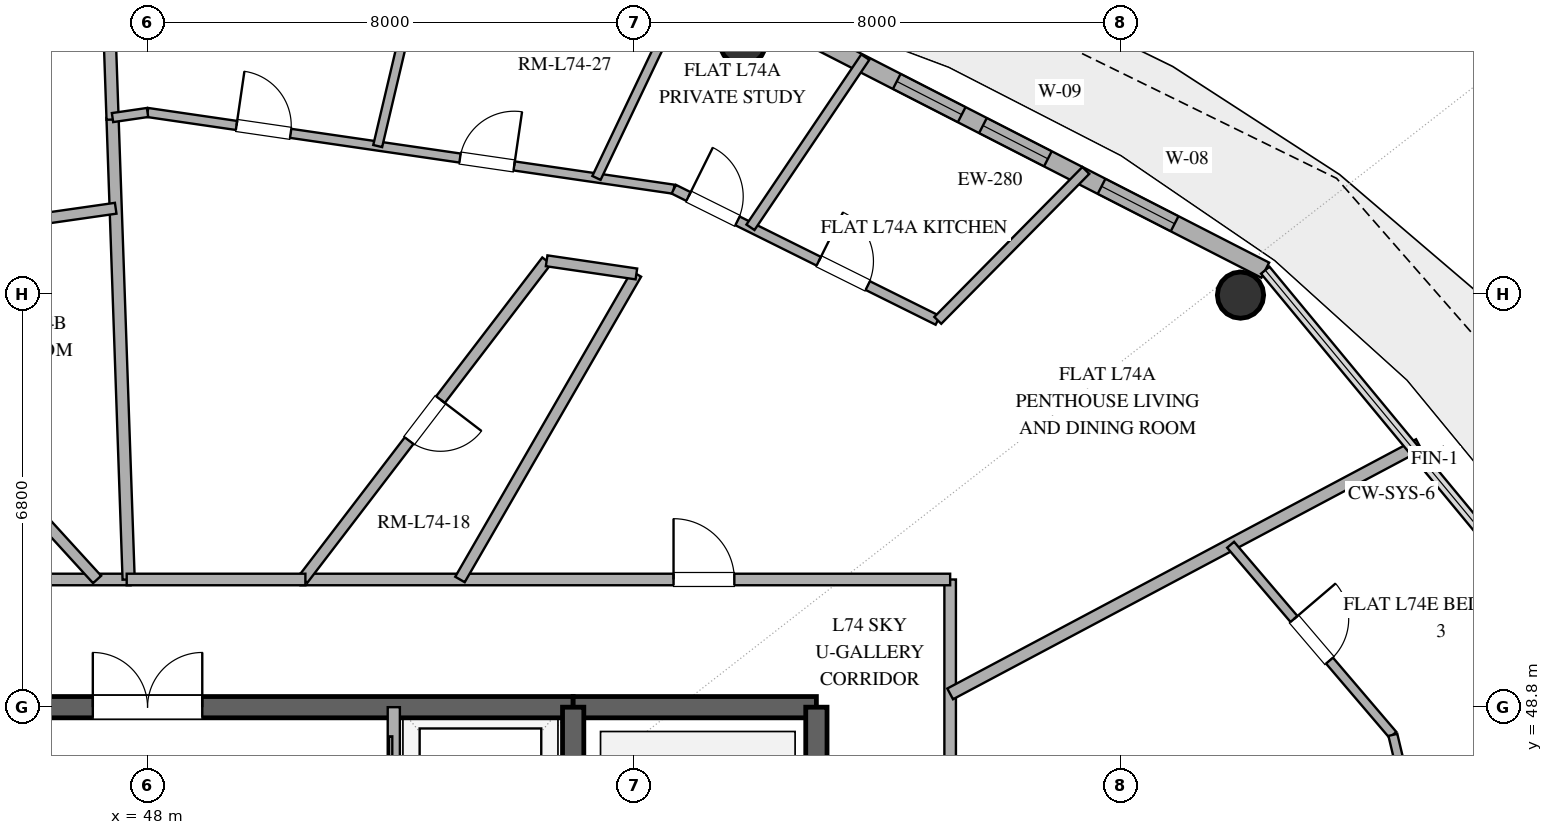
"""IFC4 building model, lengths in metres.
Left out: names, types, materials, properties, quantities, classifications, styles, units other than length and angle.
Written with IfcOpenShell. Run it as: python <this file> out.ifc"""

import sys

from ifc_helpers import new_model, si_unit, direction, frame, frame_2d, origin, origin_2d, place, context, subcontext, project, spatial, rectangle, hollow_circle, extrude, element, fill, save


model = new_model("IFC4")
c1 = context("Model", 3, precision=1e-05, world=origin(), true_north=direction((0.0, 1.0)))
c2 = subcontext(c1, "Body", "Model", "MODEL_VIEW")
j1 = project(units=[si_unit("LENGTHUNIT", "METRE"), si_unit("PLANEANGLEUNIT", "RADIAN")], contexts=[c1])
p1 = place(None, origin())
s1 = spatial("IfcSite", under=j1, at=p1, CompositionType="ELEMENT")
p2 = place(p1, origin())
s2 = spatial("IfcBuilding", under=s1, at=p2, CompositionType="ELEMENT")
p3 = place(p2, frame((0.0, 0.0, 287.4)))
s3 = spatial("IfcBuildingStorey", under=s2, at=p3, CompositionType="ELEMENT", Elevation=287.4)
p4 = place(p3, frame((41.0, 48.8, 0.0), z_axis=(0.0, 0.0, 1.0), x_axis=(1.0, 0.0, 0.0)))
e1 = element("IfcWall", 1, at=p4, inside=s3, PredefinedType="SHEAR", context=c2, shape_type="SweptSolid", body=[
    extrude(rectangle(XDim=14.0, YDim=0.35, at=frame_2d((7.0, 0.0))), origin(), (0.0, 0.0, 1.0), 3.37),
])
p5 = place(p4, frame((6.1, 0.0, 0.0)))
e2 = element("IfcOpeningElement", 2, at=p5, cuts=e1, PredefinedType="OPENING", context=c2, shape_type="SweptSolid", body=[
    extrude(rectangle(XDim=1.8, YDim=2.25, at=frame_2d((0.9, 1.125))), frame((0.0, 0.185, 0.0), z_axis=(0.0, -1.0, 0.0), x_axis=(1.0, 0.0, 0.0)), (0.0, 0.0, 1.0), 0.37),
])
p6 = place(p3, frame((55.0, 48.8, 0.0), z_axis=(0.0, 0.0, 1.0), x_axis=(1.0, 0.0, 0.0)))
e3 = element("IfcWall", 3, at=p6, inside=s3, PredefinedType="SHEAR", context=c2, shape_type="SweptSolid", body=[
    extrude(rectangle(XDim=4.0, YDim=0.35, at=frame_2d((2.0, 0.0))), origin(), (0.0, 0.0, 1.0), 3.37),
])
p7 = place(p3, frame((59.0, 35.2, 0.0), z_axis=(0.0, 0.0, 1.0), x_axis=(0.0, 1.0, 0.0)))
e4 = element("IfcWall", 4, at=p7, inside=s3, PredefinedType="SHEAR", context=c2, shape_type="SweptSolid", body=[
    extrude(rectangle(XDim=13.6, YDim=0.35, at=frame_2d((6.8, 0.0))), origin(), (0.0, 0.0, 1.0), 3.37),
])
p8 = place(p7, frame((1.5, 0.0, 0.0)))
e5 = element("IfcOpeningElement", 5, at=p8, cuts=e4, PredefinedType="OPENING", context=c2, shape_type="SweptSolid", body=[
    extrude(rectangle(XDim=1.2, YDim=2.15, at=frame_2d((0.6, 1.075))), frame((0.0, 0.185, 0.0), z_axis=(0.0, -1.0, 0.0), x_axis=(1.0, 0.0, 0.0)), (0.0, 0.0, 1.0), 0.37),
])
p9 = place(p3, frame((55.0, 35.2, 0.0), z_axis=(0.0, 0.0, 1.0), x_axis=(0.0, 1.0, 0.0)))
e6 = element("IfcWall", 6, at=p9, inside=s3, PredefinedType="SHEAR", context=c2, shape_type="SweptSolid", body=[
    extrude(rectangle(XDim=13.6, YDim=0.35, at=frame_2d((6.8, 0.0))), origin(), (0.0, 0.0, 1.0), 3.37),
])
p10 = place(p9, frame((1.15, 0.0, 0.0)))
e7 = element("IfcOpeningElement", 7, at=p10, cuts=e6, PredefinedType="OPENING", context=c2, shape_type="SweptSolid", body=[
    extrude(rectangle(XDim=1.1, YDim=2.2, at=frame_2d((0.55, 1.1))), frame((0.0, 0.185, 0.0), z_axis=(0.0, -1.0, 0.0), x_axis=(1.0, 0.0, 0.0)), (0.0, 0.0, 1.0), 0.37),
])
for number, where, z_axis, x_axis in (
    (8, (65.975, 55.576, 0.0), (0.0, 0.0, 1.0), (1.0, 0.0, 0.0)),
    (9, (57.791, 59.739, 0.0), (0.0, 0.0, 1.0), (1.0, 0.0, 0.0)),
):
    element("IfcColumn", number, at=place(p3, frame(where, z_axis=z_axis, x_axis=x_axis)), inside=s3, PredefinedType="COLUMN", context=c2, shape_type="SweptSolid", body=[
        extrude(hollow_circle(Radius=0.381, WallThickness=0.025, at=origin_2d()), origin(), (0.0, 0.0, 1.0), 3.37),
    ])
p11 = place(p3, frame((66.383, 55.987, 0.0), z_axis=(0.0, 0.0, 1.0), x_axis=(-0.890007394051, 0.455946091699, 0.0)))
e10 = element("IfcWall", 10, at=p11, inside=s3, PredefinedType="SOLIDWALL", context=c2, shape_type="SweptSolid", body=[
    extrude(rectangle(XDim=9.404, YDim=0.28, at=frame_2d((4.702, 0.0))), origin(), (0.0, 0.0, 1.0), 3.37),
])
p12 = place(p11, frame((1.675, 0.0, 0.85)))
e11 = element("IfcOpeningElement", 11, at=p12, cuts=e10, PredefinedType="OPENING", context=c2, shape_type="SweptSolid", body=[
    extrude(rectangle(XDim=1.35, YDim=1.8, at=frame_2d((0.675, 0.9))), frame((0.0, 0.15, 0.0), z_axis=(0.0, -1.0, 0.0), x_axis=(1.0, 0.0, 0.0)), (0.0, 0.0, 1.0), 0.3),
])
p13 = place(p11, frame((4.017, 0.0, 0.85)))
e12 = element("IfcOpeningElement", 12, at=p13, cuts=e10, PredefinedType="OPENING", context=c2, shape_type="SweptSolid", body=[
    extrude(rectangle(XDim=1.2, YDim=1.8, at=frame_2d((0.6, 0.9))), frame((0.0, 0.15, 0.0), z_axis=(0.0, -1.0, 0.0), x_axis=(1.0, 0.0, 0.0)), (0.0, 0.0, 1.0), 0.3),
])
p14 = place(p11, frame((5.609, 0.0, 0.85)))
e13 = element("IfcOpeningElement", 13, at=p14, cuts=e10, PredefinedType="OPENING", context=c2, shape_type="SweptSolid", body=[
    extrude(rectangle(XDim=1.2, YDim=1.8, at=frame_2d((0.6, 0.9))), frame((0.0, 0.15, 0.0), z_axis=(0.0, -1.0, 0.0), x_axis=(1.0, 0.0, 0.0)), (0.0, 0.0, 1.0), 0.3),
])
p15 = place(p3, frame((52.05, 40.98, 0.0), z_axis=(0.0, 0.0, 1.0), x_axis=(0.0, 1.0, 0.0)))
e14 = element("IfcWall", 14, at=p15, inside=s3, PredefinedType="SOLIDWALL", context=c2, shape_type="SweptSolid", body=[
    extrude(rectangle(XDim=7.82, YDim=0.2, at=frame_2d((3.91, 0.0))), origin(), (0.0, 0.0, 1.0), 2.73),
])
p16 = place(p15, frame((0.65, 0.0, 0.0)))
e15 = element("IfcOpeningElement", 15, at=p16, cuts=e14, PredefinedType="OPENING", context=c2, shape_type="SweptSolid", body=[
    extrude(rectangle(XDim=1.1, YDim=2.2, at=frame_2d((0.55, 1.1))), frame((0.0, 0.11, 0.0), z_axis=(0.0, -1.0, 0.0), x_axis=(1.0, 0.0, 0.0)), (0.0, 0.0, 1.0), 0.22),
])
p17 = place(p15, frame((3.05, 0.0, 0.0)))
e16 = element("IfcOpeningElement", 16, at=p17, cuts=e14, PredefinedType="OPENING", context=c2, shape_type="SweptSolid", body=[
    extrude(rectangle(XDim=1.1, YDim=2.2, at=frame_2d((0.55, 1.1))), frame((0.0, 0.11, 0.0), z_axis=(0.0, -1.0, 0.0), x_axis=(1.0, 0.0, 0.0)), (0.0, 0.0, 1.0), 0.22),
])
p18 = place(p15, frame((5.6, 0.0, 0.0)))
e17 = element("IfcOpeningElement", 17, at=p18, cuts=e14, PredefinedType="OPENING", context=c2, shape_type="SweptSolid", body=[
    extrude(rectangle(XDim=1.2, YDim=2.2, at=frame_2d((0.6, 1.1))), frame((0.0, 0.11, 0.0), z_axis=(0.0, -1.0, 0.0), x_axis=(1.0, 0.0, 0.0)), (0.0, 0.0, 1.0), 0.22),
])
p19 = place(p3, frame((61.2, 50.9, 0.0), z_axis=(0.0, 0.0, 1.0), x_axis=(0.0, -1.0, 0.0)))
e18 = element("IfcWall", 18, at=p19, inside=s3, PredefinedType="PARTITIONING", context=c2, shape_type="SweptSolid", body=[
    extrude(rectangle(XDim=16.9, YDim=0.19, at=frame_2d((8.45, 0.0))), origin(), (0.0, 0.0, 1.0), 2.73),
])
p20 = place(p19, frame((8.873, 0.0, 0.0)))
e19 = element("IfcOpeningElement", 19, at=p20, cuts=e18, PredefinedType="OPENING", context=c2, shape_type="SweptSolid", body=[
    extrude(rectangle(XDim=1.0, YDim=2.2, at=frame_2d((0.5, 1.1))), frame((0.0, 0.105, 0.0), z_axis=(0.0, -1.0, 0.0), x_axis=(1.0, 0.0, 0.0)), (0.0, 0.0, 1.0), 0.21),
])
p21 = place(p3, frame((34.8, 50.9, 0.0), z_axis=(0.0, 0.0, 1.0), x_axis=(1.0, 0.0, 0.0)))
e20 = element("IfcWall", 20, at=p21, inside=s3, PredefinedType="PARTITIONING", context=c2, shape_type="SweptSolid", body=[
    extrude(rectangle(XDim=12.921, YDim=0.19, at=frame_2d((6.46, 0.0))), origin(), (0.0, 0.0, 1.0), 2.73),
])
p22 = place(p21, frame((5.707, 0.0, 0.0)))
e21 = element("IfcOpeningElement", 21, at=p22, cuts=e20, PredefinedType="OPENING", context=c2, shape_type="SweptSolid", body=[
    extrude(rectangle(XDim=1.0, YDim=2.2, at=frame_2d((0.5, 1.1))), frame((0.0, 0.105, 0.0), z_axis=(0.0, -1.0, 0.0), x_axis=(1.0, 0.0, 0.0)), (0.0, 0.0, 1.0), 0.21),
])
p23 = place(p3, frame((50.515, 50.9, 0.0), z_axis=(0.0, 0.0, 1.0), x_axis=(1.0, 0.0, 0.0)))
e22 = element("IfcWall", 22, at=p23, inside=s3, PredefinedType="PARTITIONING", context=c2, shape_type="SweptSolid", body=[
    extrude(rectangle(XDim=10.685, YDim=0.19, at=frame_2d((5.342, 0.0))), origin(), (0.0, 0.0, 1.0), 2.73),
])
p24 = place(p23, frame((6.135, 0.0, 0.0)))
e23 = element("IfcOpeningElement", 23, at=p24, cuts=e22, PredefinedType="OPENING", context=c2, shape_type="SweptSolid", body=[
    extrude(rectangle(XDim=1.0, YDim=2.2, at=frame_2d((0.5, 1.1))), frame((0.0, 0.105, 0.0), z_axis=(0.0, -1.0, 0.0), x_axis=(1.0, 0.0, 0.0)), (0.0, 0.0, 1.0), 0.21),
])
p25 = place(p3, frame((42.278, 56.261, 0.0), z_axis=(0.0, 0.0, 1.0), x_axis=(0.674096276867, -0.73864349284, 0.0)))
e24 = element("IfcWall", 24, at=p25, inside=s3, PredefinedType="PLUMBINGWALL", context=c2, shape_type="SweptSolid", body=[
    extrude(rectangle(XDim=7.258, YDim=0.18, at=frame_2d((3.629, 0.0))), origin(), (0.0, 0.0, 1.0), 2.73),
])
p26 = place(p25, frame((3.204, 0.0, 0.0)))
e25 = element("IfcOpeningElement", 25, at=p26, cuts=e24, PredefinedType="OPENING", context=c2, shape_type="SweptSolid", body=[
    extrude(rectangle(XDim=0.85, YDim=2.1, at=frame_2d((0.425, 1.05))), frame((0.0, 0.1, 0.0), z_axis=(0.0, -1.0, 0.0), x_axis=(1.0, 0.0, 0.0)), (0.0, 0.0, 1.0), 0.2),
])
p27 = place(p3, frame((54.564, 56.141, 0.0), z_axis=(0.0, 0.0, 1.0), x_axis=(-0.607456974677, -0.794352581614, 0.0)))
e26 = element("IfcWall", 26, at=p27, inside=s3, PredefinedType="PLUMBINGWALL", context=c2, shape_type="SweptSolid", body=[
    extrude(rectangle(XDim=6.598, YDim=0.18, at=frame_2d((3.299, 0.0))), origin(), (0.0, 0.0, 1.0), 2.73),
])
p28 = place(p27, frame((2.874, 0.0, 0.0)))
e27 = element("IfcOpeningElement", 27, at=p28, cuts=e26, PredefinedType="OPENING", context=c2, shape_type="SweptSolid", body=[
    extrude(rectangle(XDim=0.85, YDim=2.1, at=frame_2d((0.425, 1.05))), frame((0.0, 0.1, 0.0), z_axis=(0.0, -1.0, 0.0), x_axis=(1.0, 0.0, 0.0)), (0.0, 0.0, 1.0), 0.2),
])
p29 = place(p3, frame((47.689, 50.9, 0.0), z_axis=(0.0, 0.0, 1.0), x_axis=(-0.034882659784, 0.999391414835, 0.0)))
e28 = element("IfcWall", 28, at=p29, inside=s3, PredefinedType="PARTITIONING", context=c2, shape_type="SweptSolid", body=[
    extrude(rectangle(XDim=7.601, YDim=0.2, at=frame_2d((3.8, 0.0))), origin(), (0.0, 0.0, 1.0), 2.73),
])
p30 = place(p3, frame((53.138, 50.9, 0.0), z_axis=(0.0, 0.0, 1.0), x_axis=(0.499985927882, 0.866033528173, 0.0)))
e29 = element("IfcWall", 29, at=p30, inside=s3, PredefinedType="PLUMBINGWALL", context=c2, shape_type="SweptSolid", body=[
    extrude(rectangle(XDim=5.802, YDim=0.18, at=frame_2d((2.901, 0.0))), origin(), (0.0, 0.0, 1.0), 2.73),
])
p31 = place(p3, frame((68.909, 53.118, 0.0), z_axis=(0.0, 0.0, 1.0), x_axis=(-0.882939716422, -0.469486375909, 0.0)))
e30 = element("IfcWall", 30, at=p31, inside=s3, PredefinedType="PARTITIONING", context=c2, shape_type="SweptSolid", body=[
    extrude(rectangle(XDim=8.732, YDim=0.2, at=frame_2d((4.366, 0.0))), origin(), (0.0, 0.0, 1.0), 2.73),
])
p32 = place(p3, frame((47.476, 57.005, 0.0), z_axis=(0.0, 0.0, 1.0), x_axis=(-0.989922511169, -0.141610105153, 0.0)))
e31 = element("IfcWall", 31, at=p32, inside=s3, PredefinedType="PLUMBINGWALL", context=c2, shape_type="SweptSolid", body=[
    extrude(rectangle(XDim=5.251, YDim=0.18, at=frame_2d((2.626, 0.0))), origin(), (0.0, 0.0, 1.0), 2.73),
])
p33 = place(p3, frame((65.812, 51.471, 0.0), z_axis=(0.0, 0.0, 1.0), x_axis=(0.649224667474, -0.760596694145, 0.0)))
e32 = element("IfcWall", 32, at=p33, inside=s3, PredefinedType="PARTITIONING", context=c2, shape_type="SweptSolid", body=[
    extrude(rectangle(XDim=4.11, YDim=0.15, at=frame_2d((2.055, 0.0))), origin(), (0.0, 0.0, 1.0), 2.73),
])
p34 = place(p33, frame((1.605, 0.0, 0.0)))
e33 = element("IfcOpeningElement", 33, at=p34, cuts=e32, PredefinedType="OPENING", context=c2, shape_type="SweptSolid", body=[
    extrude(rectangle(XDim=0.9, YDim=2.1, at=frame_2d((0.45, 1.05))), frame((0.0, 0.085, 0.0), z_axis=(0.0, -1.0, 0.0), x_axis=(1.0, 0.0, 0.0)), (0.0, 0.0, 1.0), 0.17),
])
p35 = place(p3, frame((48.0, 58.58, 0.0), z_axis=(0.0, 0.0, 1.0), x_axis=(0.989536136377, -0.144285254977, 0.0)))
e34 = element("IfcWall", 34, at=p35, inside=s3, PredefinedType="PARTITIONING", context=c2, shape_type="SweptSolid", body=[
    extrude(rectangle(XDim=8.746, YDim=0.15, at=frame_2d((4.373, 0.0))), origin(), (0.0, 0.0, 1.0), 2.73),
])
p36 = place(p35, frame((1.479, 0.0, 0.0)))
e35 = element("IfcOpeningElement", 35, at=p36, cuts=e34, PredefinedType="OPENING", context=c2, shape_type="SweptSolid", body=[
    extrude(rectangle(XDim=0.9, YDim=2.1, at=frame_2d((0.45, 1.05))), frame((0.0, 0.085, 0.0), z_axis=(0.0, -1.0, 0.0), x_axis=(1.0, 0.0, 0.0)), (0.0, 0.0, 1.0), 0.17),
])
p37 = place(p35, frame((5.193, 0.0, 0.0)))
e36 = element("IfcOpeningElement", 36, at=p37, cuts=e34, PredefinedType="OPENING", context=c2, shape_type="SweptSolid", body=[
    extrude(rectangle(XDim=0.9, YDim=2.1, at=frame_2d((0.45, 1.05))), frame((0.0, 0.085, 0.0), z_axis=(0.0, -1.0, 0.0), x_axis=(1.0, 0.0, 0.0)), (0.0, 0.0, 1.0), 0.17),
])
p38 = place(p3, frame((68.481, 48.345, 0.0), z_axis=(0.0, 0.0, 1.0), x_axis=(0.232298462197, -0.972644551962, 0.0)))
e37 = element("IfcWall", 37, at=p38, inside=s3, PredefinedType="PARTITIONING", context=c2, shape_type="SweptSolid", body=[
    extrude(rectangle(XDim=6.523, YDim=0.15, at=frame_2d((3.262, 0.0))), origin(), (0.0, 0.0, 1.0), 2.73),
])
p39 = place(p3, frame((56.655, 57.318, 0.0), z_axis=(0.0, 0.0, 1.0), x_axis=(0.895572412961, -0.44491578208, 0.0)))
e38 = element("IfcWall", 38, at=p39, inside=s3, PredefinedType="PLUMBINGWALL", context=c2, shape_type="SweptSolid", body=[
    extrude(rectangle(XDim=4.848, YDim=0.16, at=frame_2d((2.424, 0.0))), origin(), (0.0, 0.0, 1.0), 2.73),
])
p40 = place(p39, frame((2.662, 0.0, 0.0)))
e39 = element("IfcOpeningElement", 39, at=p40, cuts=e38, PredefinedType="OPENING", context=c2, shape_type="SweptSolid", body=[
    extrude(rectangle(XDim=0.9, YDim=2.1, at=frame_2d((0.45, 1.05))), frame((0.0, 0.09, 0.0), z_axis=(0.0, -1.0, 0.0), x_axis=(1.0, 0.0, 0.0)), (0.0, 0.0, 1.0), 0.18),
])
p41 = place(p39, frame((0.27, 0.0, 0.0)))
e40 = element("IfcOpeningElement", 40, at=p41, cuts=e38, PredefinedType="OPENING", context=c2, shape_type="SweptSolid", body=[
    extrude(rectangle(XDim=0.9, YDim=2.1, at=frame_2d((0.45, 1.05))), frame((0.0, 0.09, 0.0), z_axis=(0.0, -1.0, 0.0), x_axis=(1.0, 0.0, 0.0)), (0.0, 0.0, 1.0), 0.18),
])
p42 = place(p3, frame((60.997, 55.161, 0.0), z_axis=(0.0, 0.0, 1.0), x_axis=(0.702618919802, 0.711566338113, 0.0)))
e41 = element("IfcWall", 41, at=p42, inside=s3, PredefinedType="PLUMBINGWALL", context=c2, shape_type="SweptSolid", body=[
    extrude(rectangle(XDim=3.465, YDim=0.16, at=frame_2d((1.733, 0.0))), origin(), (0.0, 0.0, 1.0), 2.73),
])
p43 = place(p3, frame((56.842, 60.566, 0.0), z_axis=(0.0, 0.0, 1.0), x_axis=(-0.429975480416, -0.902840565239, 0.0)))
e42 = element("IfcWall", 42, at=p43, inside=s3, PredefinedType="PARTITIONING", context=c2, shape_type="SweptSolid", body=[
    extrude(rectangle(XDim=3.393, YDim=0.15, at=frame_2d((1.696, 0.0))), origin(), (0.0, 0.0, 1.0), 2.73),
])
p44 = place(p3, frame((59.804, 59.49, 0.0), z_axis=(0.0, 0.0, 1.0), x_axis=(-0.559397095435, -0.828899806743, 0.0)))
e43 = element("IfcWall", 43, at=p44, inside=s3, PredefinedType="PLUMBINGWALL", context=c2, shape_type="SweptSolid", body=[
    extrude(rectangle(XDim=3.376, YDim=0.16, at=frame_2d((1.688, 0.0))), origin(), (0.0, 0.0, 1.0), 2.73),
])
p45 = place(p3, frame((47.309, 61.797, 0.0), z_axis=(0.0, 0.0, 1.0), x_axis=(0.034921182562, -0.999390069497, 0.0)))
e44 = element("IfcWall", 44, at=p45, inside=s3, PredefinedType="PARTITIONING", context=c2, shape_type="SweptSolid", body=[
    extrude(rectangle(XDim=3.335, YDim=0.2, at=frame_2d((1.667, 0.0))), origin(), (0.0, 0.0, 1.0), 2.73),
])
p46 = place(p3, frame((51.785, 58.028, 0.0), z_axis=(0.0, 0.0, 1.0), x_axis=(0.2298279545, 0.973231273301, 0.0)))
e45 = element("IfcWall", 45, at=p46, inside=s3, PredefinedType="PARTITIONING", context=c2, shape_type="SweptSolid", body=[
    extrude(rectangle(XDim=3.278, YDim=0.15, at=frame_2d((1.639, 0.0))), origin(), (0.0, 0.0, 1.0), 2.73),
])
p47 = place(p3, frame((47.657, 50.9, 0.0), z_axis=(0.0, 0.0, 1.0), x_axis=(1.0, 0.0, 0.0)))
e46 = element("IfcWall", 46, at=p47, inside=s3, PredefinedType="PARTITIONING", context=c2, shape_type="SweptSolid", body=[
    extrude(rectangle(XDim=2.939, YDim=0.19, at=frame_2d((1.469, 0.0))), origin(), (0.0, 0.0, 1.0), 2.73),
])
p48 = place(p3, frame((56.039, 55.925, 0.0), z_axis=(0.0, 0.0, 1.0), x_axis=(-0.989402061703, 0.14520179165, 0.0)))
e47 = element("IfcWall", 47, at=p48, inside=s3, PredefinedType="PLUMBINGWALL", context=c2, shape_type="SweptSolid", body=[
    extrude(rectangle(XDim=1.491, YDim=0.18, at=frame_2d((0.746, 0.0))), origin(), (0.0, 0.0, 1.0), 2.73),
])
p49 = place(p3, frame((47.424, 58.496, 0.0), z_axis=(0.0, 0.0, 1.0), x_axis=(0.989534228924, 0.144298336053, 0.0)))
e48 = element("IfcWall", 48, at=p49, inside=s3, PredefinedType="PARTITIONING", context=c2, shape_type="SweptSolid", body=[
    extrude(rectangle(XDim=0.582, YDim=0.15, at=frame_2d((0.291, 0.0))), origin(), (0.0, 0.0, 1.0), 2.73),
])
p50 = place(p12, origin())
e49 = element("IfcWindow", 49, at=p50, inside=s3, PartitioningType="SINGLE_PANEL", PredefinedType="WINDOW", context=c2, shape_type="SweptSolid", body=[
    extrude(rectangle(XDim=1.35, YDim=1.8, at=frame_2d((0.675, 0.9))), frame((0.0, 0.03, 0.0), z_axis=(0.0, -1.0, 0.0), x_axis=(1.0, 0.0, 0.0)), (0.0, 0.0, 1.0), 0.06),
])
fill(e11, e49)
p51 = place(p13, origin())
e50 = element("IfcWindow", 50, at=p51, inside=s3, PartitioningType="SINGLE_PANEL", PredefinedType="WINDOW", context=c2, shape_type="SweptSolid", body=[
    extrude(rectangle(XDim=1.2, YDim=1.8, at=frame_2d((0.6, 0.9))), frame((0.0, 0.03, 0.0), z_axis=(0.0, -1.0, 0.0), x_axis=(1.0, 0.0, 0.0)), (0.0, 0.0, 1.0), 0.06),
])
fill(e12, e50)
p52 = place(p14, origin())
e51 = element("IfcWindow", 51, at=p52, inside=s3, PartitioningType="SINGLE_PANEL", PredefinedType="WINDOW", context=c2, shape_type="SweptSolid", body=[
    extrude(rectangle(XDim=1.2, YDim=1.8, at=frame_2d((0.6, 0.9))), frame((0.0, 0.03, 0.0), z_axis=(0.0, -1.0, 0.0), x_axis=(1.0, 0.0, 0.0)), (0.0, 0.0, 1.0), 0.06),
])
fill(e13, e51)
p53 = place(p5, origin())
e52 = element("IfcDoor", 52, at=p53, inside=s3, OperationType="DOUBLE_DOOR_SINGLE_SWING", PredefinedType="DOOR", context=c2, shape_type="SweptSolid", body=[
    extrude(rectangle(XDim=1.8, YDim=2.25, at=frame_2d((0.9, 1.125))), frame((0.0, 0.025, 0.0), z_axis=(0.0, -1.0, 0.0), x_axis=(1.0, 0.0, 0.0)), (0.0, 0.0, 1.0), 0.05),
])
fill(e2, e52)
p54 = place(p24, origin())
e53 = element("IfcDoor", 53, at=p54, inside=s3, OperationType="SINGLE_SWING_LEFT", PredefinedType="DOOR", context=c2, shape_type="SweptSolid", body=[
    extrude(rectangle(XDim=1.0, YDim=2.2, at=frame_2d((0.5, 1.1))), frame((0.0, 0.025, 0.0), z_axis=(0.0, -1.0, 0.0), x_axis=(1.0, 0.0, 0.0)), (0.0, 0.0, 1.0), 0.05),
])
fill(e23, e53)
p55 = place(p28, origin())
e54 = element("IfcDoor", 54, at=p55, inside=s3, OperationType="SINGLE_SWING_LEFT", PredefinedType="DOOR", context=c2, shape_type="SweptSolid", body=[
    extrude(rectangle(XDim=0.85, YDim=2.1, at=frame_2d((0.425, 1.05))), frame((0.0, 0.025, 0.0), z_axis=(0.0, -1.0, 0.0), x_axis=(1.0, 0.0, 0.0)), (0.0, 0.0, 1.0), 0.05),
])
fill(e27, e54)
p56 = place(p34, origin())
e55 = element("IfcDoor", 55, at=p56, inside=s3, OperationType="SINGLE_SWING_LEFT", PredefinedType="DOOR", context=c2, shape_type="SweptSolid", body=[
    extrude(rectangle(XDim=0.9, YDim=2.1, at=frame_2d((0.45, 1.05))), frame((0.0, 0.025, 0.0), z_axis=(0.0, -1.0, 0.0), x_axis=(1.0, 0.0, 0.0)), (0.0, 0.0, 1.0), 0.05),
])
fill(e33, e55)
p57 = place(p36, origin())
e56 = element("IfcDoor", 56, at=p57, inside=s3, OperationType="SINGLE_SWING_LEFT", PredefinedType="DOOR", context=c2, shape_type="SweptSolid", body=[
    extrude(rectangle(XDim=0.9, YDim=2.1, at=frame_2d((0.45, 1.05))), frame((0.0, 0.025, 0.0), z_axis=(0.0, -1.0, 0.0), x_axis=(1.0, 0.0, 0.0)), (0.0, 0.0, 1.0), 0.05),
])
fill(e35, e56)
p58 = place(p37, origin())
e57 = element("IfcDoor", 57, at=p58, inside=s3, OperationType="SINGLE_SWING_RIGHT", PredefinedType="DOOR", context=c2, shape_type="SweptSolid", body=[
    extrude(rectangle(XDim=0.9, YDim=2.1, at=frame_2d((0.45, 1.05))), frame((0.0, 0.025, 0.0), z_axis=(0.0, -1.0, 0.0), x_axis=(1.0, 0.0, 0.0)), (0.0, 0.0, 1.0), 0.05),
])
fill(e36, e57)
p59 = place(p40, origin())
e58 = element("IfcDoor", 58, at=p59, inside=s3, OperationType="SINGLE_SWING_LEFT", PredefinedType="DOOR", context=c2, shape_type="SweptSolid", body=[
    extrude(rectangle(XDim=0.9, YDim=2.1, at=frame_2d((0.45, 1.05))), frame((0.0, 0.025, 0.0), z_axis=(0.0, -1.0, 0.0), x_axis=(1.0, 0.0, 0.0)), (0.0, 0.0, 1.0), 0.05),
])
fill(e39, e58)
p60 = place(p41, origin())
e59 = element("IfcDoor", 59, at=p60, inside=s3, OperationType="SINGLE_SWING_LEFT", PredefinedType="DOOR", context=c2, shape_type="SweptSolid", body=[
    extrude(rectangle(XDim=0.9, YDim=2.1, at=frame_2d((0.45, 1.05))), frame((0.0, 0.025, 0.0), z_axis=(0.0, -1.0, 0.0), x_axis=(1.0, 0.0, 0.0)), (0.0, 0.0, 1.0), 0.05),
])
fill(e40, e59)
save(model, sys.argv[1])
